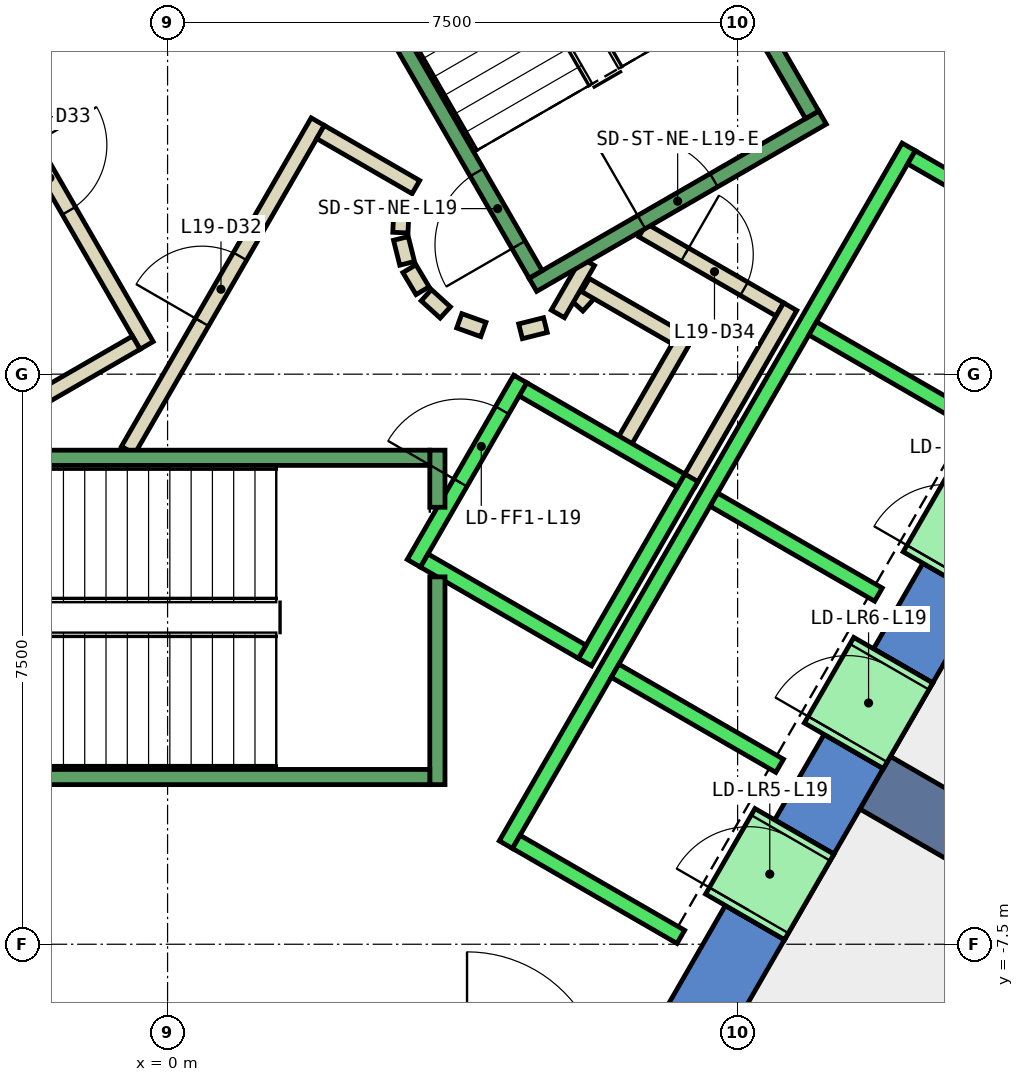
"""IFC4 building model, lengths in metres.
Left out: names, types, materials, properties, quantities, classifications, styles, units other than length and angle.
Written with IfcOpenShell. Run it as: python <this file> out.ifc"""

import sys

from ifc_helpers import new_model, si_unit, direction, frame, frame_2d, origin, place, context, subcontext, project, spatial, polyline, rectangle, outline, extrude, element, fill, save


model = new_model("IFC4")
c1 = context("Model", 3, precision=1e-05, world=origin(), true_north=direction((0.0, 1.0)))
c2 = subcontext(c1, "Body", "Model", "MODEL_VIEW")
j1 = project(units=[si_unit("LENGTHUNIT", "METRE"), si_unit("PLANEANGLEUNIT", "RADIAN")], contexts=[c1])
p1 = place(None, origin())
s1 = spatial("IfcSite", under=j1, at=p1, CompositionType="ELEMENT")
p2 = place(p1, origin())
s2 = spatial("IfcBuilding", under=s1, at=p2, CompositionType="ELEMENT")
p3 = place(p2, frame((0.0, 0.0, 90.8)))
s3 = spatial("IfcBuildingStorey", under=s2, at=p3, CompositionType="ELEMENT", Elevation=90.8)
p4 = place(p3, frame((0.0, 0.0, -0.4)))
e1 = element("IfcWall", 1, at=p4, inside=s3, PredefinedType="SHEAR", context=c2, shape_type="SweptSolid", body=[
    extrude(outline(polyline([(8.517, 11.748), (7.738, 11.298), (12.817, 2.5), (13.856, 2.5), (8.517, 11.748)])), origin(), (0.0, 0.0, 1.0), 4.2),
])
p5 = place(p3, frame((0.0, 0.0, -0.4)))
e2 = element("IfcWall", 2, at=p5, inside=s3, PredefinedType="SHEAR", context=c2, shape_type="SweptSolid", body=[
    extrude(outline(polyline([(8.117, -7.44), (7.338, -6.99), (6.409, -8.6), (6.928, -9.5), (8.117, -7.44)])), origin(), (0.0, 0.0, 1.0), 4.2),
])
p6 = place(p3, frame((0.0, 0.0, -0.4)))
e3 = element("IfcWall", 3, at=p6, inside=s3, PredefinedType="SHEAR", context=c2, shape_type="SweptSolid", body=[
    extrude(outline(polyline([(9.417, -5.189), (8.638, -4.739), (7.988, -5.864), (8.767, -6.314), (9.417, -5.189)])), origin(), (0.0, 0.0, 1.0), 4.2),
])
p7 = place(p3, frame((0.0, 0.0, -0.4)))
e4 = element("IfcWall", 4, at=p7, inside=s3, PredefinedType="SHEAR", context=c2, shape_type="SweptSolid", body=[
    extrude(outline(polyline([(10.717, -2.937), (9.938, -2.487), (9.288, -3.613), (10.067, -4.063), (10.717, -2.937)])), origin(), (0.0, 0.0, 1.0), 4.2),
])
p8 = place(p3, frame((0.0, 0.0, 3.6)))
e5 = element("IfcWall", 5, at=p8, inside=s3, PredefinedType="SHEAR", context=c2, shape_type="SweptSolid", body=[
    extrude(outline(polyline([(8.767, -6.314), (7.988, -5.864), (7.338, -6.99), (8.117, -7.44), (8.767, -6.314)])), origin(), (0.0, 0.0, 1.0), 0.2),
])
p9 = place(p3, frame((0.0, 0.0, 3.6)))
e6 = element("IfcWall", 6, at=p9, inside=s3, PredefinedType="SHEAR", context=c2, shape_type="SweptSolid", body=[
    extrude(outline(polyline([(10.067, -4.063), (9.288, -3.613), (8.638, -4.739), (9.417, -5.189), (10.067, -4.063)])), origin(), (0.0, 0.0, 1.0), 0.2),
])
p10 = place(p3, frame((0.0, 0.0, 3.6)))
e7 = element("IfcWall", 7, at=p10, inside=s3, PredefinedType="SHEAR", context=c2, shape_type="SweptSolid", body=[
    extrude(outline(polyline([(11.367, -1.811), (10.588, -1.361), (9.938, -2.487), (10.717, -2.937), (11.367, -1.811)])), origin(), (0.0, 0.0, 1.0), 0.2),
])
p11 = place(p3, frame((9.31, -5.375, -0.4), z_axis=(0.0, 0.0, 1.0), x_axis=(0.866017533419, -0.500013631625, 0.0)))
e8 = element("IfcWall", 8, at=p11, inside=s3, PredefinedType="SHEAR", context=c2, shape_type="SweptSolid", body=[
    extrude(rectangle(XDim=9.0, YDim=0.8, at=frame_2d((4.5, 0.0))), origin(), (0.0, 0.0, 1.0), 4.2),
])
p12 = place(p3, frame((5.39, 0.898, 0.0), z_axis=(0.0, 0.0, 1.0), x_axis=(0.673828488714, 0.738887791073, 0.0)))
e9 = element("IfcWall", 9, at=p12, inside=s3, PredefinedType="PARTITIONING", context=c2, shape_type="SweptSolid", body=[
    extrude(rectangle(XDim=0.263, YDim=0.2, at=frame_2d((0.131, 0.0))), origin(), (0.0, 0.0, 1.0), 3.8),
])
p13 = place(p3, frame((5.499, 1.172, 0.0), z_axis=(0.0, 0.0, 1.0), x_axis=(0.866333505267, -0.499465972466, 0.0)))
e10 = element("IfcWall", 10, at=p13, inside=s3, PredefinedType="PARTITIONING", context=c2, shape_type="SweptSolid", body=[
    extrude(rectangle(XDim=1.374, YDim=0.2, at=frame_2d((0.687, 0.0))), origin(), (0.0, 0.0, 1.0), 3.8),
])
p14 = place(p3, frame((6.826, 0.522, 0.0), z_axis=(0.0, 0.0, 1.0), x_axis=(-0.500016722714, -0.866015748706, 0.0)))
e11 = element("IfcWall", 11, at=p14, inside=s3, PredefinedType="PARTITIONING", context=c2, shape_type="SweptSolid", body=[
    extrude(rectangle(XDim=1.7, YDim=0.2, at=frame_2d((0.85, 0.0))), origin(), (0.0, 0.0, 1.0), 3.8),
])
p15 = place(p3, frame((6.25, 1.894, 0.0), z_axis=(0.0, 0.0, 1.0), x_axis=(0.866043184279, -0.499969202016, 0.0)))
e12 = element("IfcWall", 12, at=p15, inside=s3, PredefinedType="PARTITIONING", context=c2, shape_type="SweptSolid", body=[
    extrude(rectangle(XDim=2.084, YDim=0.2, at=frame_2d((1.042, 0.0))), origin(), (0.0, 0.0, 1.0), 3.8),
])
p16 = place(p15, frame((0.642, 0.0, 0.0)))
e13 = element("IfcOpeningElement", 13, at=p16, cuts=e12, PredefinedType="OPENING", context=c2, shape_type="SweptSolid", body=[
    extrude(rectangle(XDim=0.9, YDim=2.1, at=frame_2d((0.45, 1.05))), frame((0.0, 0.11, 0.0), z_axis=(0.0, -1.0, 0.0), x_axis=(1.0, 0.0, 0.0)), (0.0, 0.0, 1.0), 0.22),
])
p17 = place(p3, frame((8.192, 0.888, 0.0), z_axis=(0.0, 0.0, 1.0), x_axis=(-0.499940625693, -0.866059680843, 0.0)))
e14 = element("IfcWall", 14, at=p17, inside=s3, PredefinedType="PARTITIONING", context=c2, shape_type="SweptSolid", body=[
    extrude(rectangle(XDim=2.68, YDim=0.2, at=frame_2d((1.34, 0.0))), origin(), (0.0, 0.0, 1.0), 3.8),
])
p18 = place(p3, frame((5.135, 0.793, 0.0), z_axis=(0.0, 0.0, 1.0), x_axis=(0.499526442893, 0.866298639529, 0.0)))
e15 = element("IfcWall", 15, at=p18, inside=s3, PredefinedType="PARTITIONING", context=c2, shape_type="SweptSolid", body=[
    extrude(rectangle(XDim=0.791, YDim=0.2, at=frame_2d((0.396, 0.0))), origin(), (0.0, 0.0, 1.0), 3.8),
])
p19 = place(p3, frame((-0.52, -1.0, 0.0), z_axis=(0.0, 0.0, 1.0), x_axis=(0.50011622646, 0.865958290007, 0.0)))
e16 = element("IfcWall", 16, at=p19, inside=s3, PredefinedType="PARTITIONING", context=c2, shape_type="SweptSolid", body=[
    extrude(rectangle(XDim=4.991, YDim=0.2, at=frame_2d((2.496, 0.0))), origin(), (0.0, 0.0, 1.0), 3.8),
])
p20 = place(p19, frame((1.945, 0.0, 0.0)))
e17 = element("IfcOpeningElement", 17, at=p20, cuts=e16, PredefinedType="OPENING", context=c2, shape_type="SweptSolid", body=[
    extrude(rectangle(XDim=1.0, YDim=2.1, at=frame_2d((0.5, 1.05))), frame((0.0, 0.11, 0.0), z_axis=(0.0, -1.0, 0.0), x_axis=(1.0, 0.0, 0.0)), (0.0, 0.0, 1.0), 0.22),
])
p21 = place(p3, frame((2.012, 3.186, 0.0), z_axis=(0.0, 0.0, 1.0), x_axis=(0.865891012941, -0.500232699559, 0.0)))
e18 = element("IfcWall", 18, at=p21, inside=s3, PredefinedType="PARTITIONING", context=c2, shape_type="SweptSolid", body=[
    extrude(rectangle(XDim=1.449, YDim=0.2, at=frame_2d((0.725, 0.0))), origin(), (0.0, 0.0, 1.0), 3.8),
])
p22 = place(p3, frame((3.079, 2.199, 0.0), z_axis=(0.0, 0.0, 1.0), x_axis=(-0.047771483479, -0.998858290933, 0.0)))
e19 = element("IfcWall", 19, at=p22, inside=s3, PredefinedType="PARTITIONING", context=c2, shape_type="SweptSolid", body=[
    extrude(rectangle(XDim=0.337, YDim=0.2, at=frame_2d((0.169, 0.0))), origin(), (0.0, 0.0, 1.0), 3.8),
])
p23 = place(p3, frame((3.07, 1.786, 0.0), z_axis=(0.0, 0.0, 1.0), x_axis=(0.242705583207, -0.970099994784, 0.0)))
e20 = element("IfcWall", 20, at=p23, inside=s3, PredefinedType="PARTITIONING", context=c2, shape_type="SweptSolid", body=[
    extrude(rectangle(XDim=0.338, YDim=0.2, at=frame_2d((0.169, 0.0))), origin(), (0.0, 0.0, 1.0), 3.8),
])
for number, where, z_axis, x_axis in (
    (21, (3.182, 1.388, 0.0), (0.0, 0.0, 1.0), (0.512, -0.859, 0.0)),
    (22, (3.404, 1.039, 0.0), (0.0, 0.0, 1.0), (0.74, -0.672, 0.0)),
):
    element("IfcWall", number, at=place(p3, frame(where, z_axis=z_axis, x_axis=x_axis)), inside=s3, PredefinedType="PARTITIONING", context=c2, shape_type="SweptSolid", body=[
        extrude(rectangle(XDim=0.338, YDim=0.2, at=frame_2d((0.169, 0.0))), origin(), (0.0, 0.0, 1.0), 3.8),
    ])
p24 = place(p3, frame((3.838, 0.702, 0.0), z_axis=(0.0, 0.0, 1.0), x_axis=(0.941035081519, -0.338308993895, 0.0)))
e23 = element("IfcWall", 23, at=p24, inside=s3, PredefinedType="PARTITIONING", context=c2, shape_type="SweptSolid", body=[
    extrude(rectangle(XDim=0.337, YDim=0.2, at=frame_2d((0.168, 0.0))), origin(), (0.0, 0.0, 1.0), 3.8),
])
p25 = place(p3, frame((4.644, 0.564, 0.0), z_axis=(0.0, 0.0, 1.0), x_axis=(0.969929076366, 0.243387729394, 0.0)))
e24 = element("IfcWall", 24, at=p25, inside=s3, PredefinedType="PARTITIONING", context=c2, shape_type="SweptSolid", body=[
    extrude(rectangle(XDim=0.337, YDim=0.2, at=frame_2d((0.168, 0.0))), origin(), (0.0, 0.0, 1.0), 3.8),
])
p26 = place(p3, frame((-2.771, 4.7, 0.0), z_axis=(0.0, 0.0, 1.0), x_axis=(0.499969479948, -0.866043023828, 0.0)))
e25 = element("IfcWall", 25, at=p26, inside=s3, PredefinedType="PARTITIONING", context=c2, shape_type="SweptSolid", body=[
    extrude(rectangle(XDim=4.99, YDim=0.2, at=frame_2d((2.495, 0.0))), origin(), (0.0, 0.0, 1.0), 3.8),
])
p27 = place(p26, frame((1.945, 0.0, 0.0)))
e26 = element("IfcOpeningElement", 26, at=p27, cuts=e25, PredefinedType="OPENING", context=c2, shape_type="SweptSolid", body=[
    extrude(rectangle(XDim=1.0, YDim=2.1, at=frame_2d((0.5, 1.05))), frame((0.0, 0.11, 0.0), z_axis=(0.0, -1.0, 0.0), x_axis=(1.0, 0.0, 0.0)), (0.0, 0.0, 1.0), 0.22),
])
p28 = place(p3, frame((-0.412, 0.414, 0.0), z_axis=(0.0, 0.0, 1.0), x_axis=(-0.866017369001, -0.500013916395, 0.0)))
e27 = element("IfcWall", 27, at=p28, inside=s3, PredefinedType="PARTITIONING", context=c2, shape_type="SweptSolid", body=[
    extrude(rectangle(XDim=1.45, YDim=0.2, at=frame_2d((0.725, 0.0))), origin(), (0.0, 0.0, 1.0), 3.8),
])
p29 = place(p3, frame((12.401, -7.621, 0.0), z_axis=(0.0, 0.0, 1.0), x_axis=(-0.499983724212, -0.866034800411, 0.0)))
e28 = element("IfcWall", 28, at=p29, inside=s3, PredefinedType="PARTITIONING", context=c2, shape_type="SweptSolid", body=[
    extrude(rectangle(XDim=9.302, YDim=0.2, at=frame_2d((4.651, 0.0))), origin(), (0.0, 0.0, 1.0), 3.8),
])
p30 = place(p3, frame((3.24, -2.488, 0.0), z_axis=(0.0, 0.0, 1.0), x_axis=(0.49994636267, 0.866056369097, 0.0)))
e29 = element("IfcWall", 29, at=p30, inside=s3, PredefinedType="STANDARD", context=c2, shape_type="SweptSolid", body=[
    extrude(rectangle(XDim=2.8, YDim=0.2, at=frame_2d((1.4, 0.0))), origin(), (0.0, 0.0, 1.0), 3.8),
])
p31 = place(p30, frame((1.225, 0.0, 0.0)))
e30 = element("IfcOpeningElement", 30, at=p31, cuts=e29, PredefinedType="OPENING", context=c2, shape_type="SweptSolid", body=[
    extrude(rectangle(XDim=1.1, YDim=2.1, at=frame_2d((0.55, 1.05))), frame((0.0, 0.11, 0.0), z_axis=(0.0, -1.0, 0.0), x_axis=(1.0, 0.0, 0.0)), (0.0, 0.0, 1.0), 0.22),
])
p32 = place(p3, frame((5.492, -3.788, 0.0), z_axis=(0.0, 0.0, 1.0), x_axis=(0.500011755427, 0.866018616679, 0.0)))
e31 = element("IfcWall", 31, at=p32, inside=s3, PredefinedType="STANDARD", context=c2, shape_type="SweptSolid", body=[
    extrude(rectangle(XDim=2.8, YDim=0.2, at=frame_2d((1.4, 0.0))), origin(), (0.0, 0.0, 1.0), 3.8),
])
p33 = place(p3, frame((3.377, -2.452, 0.0), z_axis=(0.0, 0.0, 1.0), x_axis=(0.865955154139, -0.50012165622, 0.0)))
e32 = element("IfcWall", 32, at=p33, inside=s3, PredefinedType="STANDARD", context=c2, shape_type="SweptSolid", body=[
    extrude(rectangle(XDim=2.4, YDim=0.2, at=frame_2d((1.2, 0.0))), origin(), (0.0, 0.0, 1.0), 3.8),
])
p34 = place(p3, frame((4.677, -0.2, 0.0), z_axis=(0.0, 0.0, 1.0), x_axis=(0.865973769406, -0.500089422704, 0.0)))
e33 = element("IfcWall", 33, at=p34, inside=s3, PredefinedType="STANDARD", context=c2, shape_type="SweptSolid", body=[
    extrude(rectangle(XDim=2.399, YDim=0.2, at=frame_2d((1.2, 0.0))), origin(), (0.0, 0.0, 1.0), 3.8),
])
p35 = place(p3, frame((4.451, -6.19, 0.0), z_axis=(0.0, 0.0, 1.0), x_axis=(0.50000090737, 0.866024879913, 0.0)))
e34 = element("IfcWall", 34, at=p35, inside=s3, PredefinedType="STANDARD", context=c2, shape_type="SweptSolid", body=[
    extrude(rectangle(XDim=10.6, YDim=0.2, at=frame_2d((5.3, 0.0))), origin(), (0.0, 0.0, 1.0), 3.8),
])
for number, where, z_axis, x_axis in (
    (35, (4.588, -6.153, 0.0), (0.0, 0.0, 1.0), (0.866, -0.5, 0.0)),
    (36, (5.888, -3.902, 0.0), (0.0, 0.0, 1.0), (0.866, -0.5, 0.0)),
    (37, (7.188, -1.65, 0.0), (0.0, 0.0, 1.0), (0.866, -0.5, 0.0)),
    (38, (8.488, 0.602, 0.0), (0.0, 0.0, 1.0), (0.866, -0.5, 0.0)),
):
    element("IfcWall", number, at=place(p3, frame(where, z_axis=z_axis, x_axis=x_axis)), inside=s3, PredefinedType="STANDARD", context=c2, shape_type="SweptSolid", body=[
        extrude(rectangle(XDim=2.5, YDim=0.2, at=frame_2d((1.25, 0.0))), origin(), (0.0, 0.0, 1.0), 3.8),
    ])
p36 = place(p3, frame((9.788, 2.853, 0.0), z_axis=(0.0, 0.0, 1.0), x_axis=(0.865998541277, -0.500046524342, 0.0)))
e39 = element("IfcWall", 39, at=p36, inside=s3, PredefinedType="STANDARD", context=c2, shape_type="SweptSolid", body=[
    extrude(rectangle(XDim=2.5, YDim=0.2, at=frame_2d((1.25, 0.0))), origin(), (0.0, 0.0, 1.0), 3.8),
])
p37 = place(p3, frame((7.598, -7.14, 0.0), z_axis=(0.0, 0.0, 1.0), x_axis=(0.500362116554, 0.865816234728, 0.0)))
e40 = element("IfcWall", 40, at=p37, inside=s3, PredefinedType="STANDARD", context=c2, shape_type="SweptSolid", body=[
    extrude(rectangle(XDim=1.299, YDim=1.2, at=frame_2d((0.65, 0.0))), origin(), (0.0, 0.0, 1.0), 2.4),
])
p38 = place(p37, frame((0.1, 0.0, 0.0)))
e41 = element("IfcOpeningElement", 41, at=p38, cuts=e40, PredefinedType="OPENING", context=c2, shape_type="SweptSolid", body=[
    extrude(rectangle(XDim=1.1, YDim=2.3, at=frame_2d((0.55, 1.15))), frame((0.0, 0.61, 0.0), z_axis=(0.0, -1.0, 0.0), x_axis=(1.0, 0.0, 0.0)), (0.0, 0.0, 1.0), 1.22),
])
p39 = place(p3, frame((8.898, -4.889, 0.0), z_axis=(0.0, 0.0, 1.0), x_axis=(0.500036693733, 0.866004217611, 0.0)))
e42 = element("IfcWall", 42, at=p39, inside=s3, PredefinedType="STANDARD", context=c2, shape_type="SweptSolid", body=[
    extrude(rectangle(XDim=1.3, YDim=1.2, at=frame_2d((0.65, 0.0))), origin(), (0.0, 0.0, 1.0), 2.4),
])
p40 = place(p39, frame((0.1, 0.0, 0.0)))
e43 = element("IfcOpeningElement", 43, at=p40, cuts=e42, PredefinedType="OPENING", context=c2, shape_type="SweptSolid", body=[
    extrude(rectangle(XDim=1.1, YDim=2.3, at=frame_2d((0.55, 1.15))), frame((0.0, 0.61, 0.0), z_axis=(0.0, -1.0, 0.0), x_axis=(1.0, 0.0, 0.0)), (0.0, 0.0, 1.0), 1.22),
])
p41 = place(p3, frame((10.198, -2.637, 0.0), z_axis=(0.0, 0.0, 1.0), x_axis=(0.49989585183, 0.866085525409, 0.0)))
e44 = element("IfcWall", 44, at=p41, inside=s3, PredefinedType="STANDARD", context=c2, shape_type="SweptSolid", body=[
    extrude(rectangle(XDim=1.3, YDim=1.2, at=frame_2d((0.65, 0.0))), origin(), (0.0, 0.0, 1.0), 2.4),
])
p42 = place(p41, frame((0.1, 0.0, 0.0)))
e45 = element("IfcOpeningElement", 45, at=p42, cuts=e44, PredefinedType="OPENING", context=c2, shape_type="SweptSolid", body=[
    extrude(rectangle(XDim=1.1, YDim=2.3, at=frame_2d((0.55, 1.15))), frame((0.0, 0.61, 0.0), z_axis=(0.0, -1.0, 0.0), x_axis=(1.0, 0.0, 0.0)), (0.0, 0.0, 1.0), 1.22),
])
p43 = place(p3, frame((3.55, -2.667, 0.0), z_axis=(0.0, 0.0, 1.0), x_axis=(0.0, -1.0, 0.0)))
e46 = element("IfcWall", 46, at=p43, inside=s3, PredefinedType="STANDARD", context=c2, shape_type="SweptSolid", body=[
    extrude(rectangle(XDim=2.733, YDim=0.2, at=frame_2d((1.366, 0.0))), origin(), (0.0, 0.0, 1.0), 3.8),
])
p44 = place(p3, frame((3.55, -1.0, 0.0), z_axis=(0.0, 0.0, 1.0), x_axis=(0.0, -1.0, 0.0)))
e47 = element("IfcWall", 47, at=p44, inside=s3, PredefinedType="STANDARD", context=c2, shape_type="SweptSolid", body=[
    extrude(rectangle(XDim=0.751, YDim=0.2, at=frame_2d((0.375, 0.0))), origin(), (0.0, 0.0, 1.0), 3.8),
])
p45 = place(p3, frame((-3.45, -1.1, 0.0), z_axis=(0.0, 0.0, 1.0), x_axis=(1.0, 0.0, 0.0)))
e48 = element("IfcWall", 48, at=p45, inside=s3, PredefinedType="STANDARD", context=c2, shape_type="SweptSolid", body=[
    extrude(rectangle(XDim=6.9, YDim=0.2, at=frame_2d((3.45, 0.0))), origin(), (0.0, 0.0, 1.0), 3.8),
])
p46 = place(p45, frame((0.45, 0.0, 0.0)))
e49 = element("IfcOpeningElement", 49, at=p46, cuts=e48, PredefinedType="OPENING", context=c2, shape_type="SweptSolid", body=[
    extrude(rectangle(XDim=1.1, YDim=2.2, at=frame_2d((0.55, 1.1))), frame((0.0, 0.11, 0.0), z_axis=(0.0, -1.0, 0.0), x_axis=(1.0, 0.0, 0.0)), (0.0, 0.0, 1.0), 0.22),
])
p47 = place(p3, frame((-3.45, -5.3, 0.0), z_axis=(0.0, 0.0, 1.0), x_axis=(1.0, 0.0, 0.0)))
e50 = element("IfcWall", 50, at=p47, inside=s3, PredefinedType="STANDARD", context=c2, shape_type="SweptSolid", body=[
    extrude(rectangle(XDim=6.9, YDim=0.2, at=frame_2d((3.45, 0.0))), origin(), (0.0, 0.0, 1.0), 3.8),
])
p48 = place(p3, frame((4.806, 1.176, 0.0), z_axis=(0.0, 0.0, 1.0), x_axis=(0.866059941101, 0.499940174841, 0.0)))
e51 = element("IfcWall", 51, at=p48, inside=s3, PredefinedType="STANDARD", context=c2, shape_type="SweptSolid", body=[
    extrude(rectangle(XDim=4.4, YDim=0.2, at=frame_2d((2.2, 0.0))), origin(), (0.0, 0.0, 1.0), 3.8),
])
p49 = place(p48, frame((1.65, 0.0, 0.0)))
e52 = element("IfcOpeningElement", 52, at=p49, cuts=e51, PredefinedType="OPENING", context=c2, shape_type="SweptSolid", body=[
    extrude(rectangle(XDim=1.1, YDim=2.2, at=frame_2d((0.55, 1.1))), frame((0.0, 0.11, 0.0), z_axis=(0.0, -1.0, 0.0), x_axis=(1.0, 0.0, 0.0)), (0.0, 0.0, 1.0), 0.22),
])
p50 = place(p3, frame((4.843, 1.312, 0.0), z_axis=(0.0, 0.0, 1.0), x_axis=(-0.499963383562, 0.866046543262, 0.0)))
e53 = element("IfcWall", 53, at=p50, inside=s3, PredefinedType="STANDARD", context=c2, shape_type="SweptSolid", body=[
    extrude(rectangle(XDim=6.9, YDim=0.2, at=frame_2d((3.45, 0.0))), origin(), (0.0, 0.0, 1.0), 3.8),
])
p51 = place(p50, frame((0.45, 0.0, 0.0)))
e54 = element("IfcOpeningElement", 54, at=p51, cuts=e53, PredefinedType="OPENING", context=c2, shape_type="SweptSolid", body=[
    extrude(rectangle(XDim=1.1, YDim=2.2, at=frame_2d((0.55, 1.1))), frame((0.0, 0.11, 0.0), z_axis=(0.0, -1.0, 0.0), x_axis=(1.0, 0.0, 0.0)), (0.0, 0.0, 1.0), 0.22),
])
p52 = place(p3, frame((8.48, 3.412, 0.0), z_axis=(0.0, 0.0, 1.0), x_axis=(-0.499978703459, 0.866037698999, 0.0)))
e55 = element("IfcWall", 55, at=p52, inside=s3, PredefinedType="STANDARD", context=c2, shape_type="SweptSolid", body=[
    extrude(rectangle(XDim=6.9, YDim=0.2, at=frame_2d((3.45, 0.0))), origin(), (0.0, 0.0, 1.0), 3.8),
])
p53 = place(p3, frame((-1.393, 7.288, 0.0), z_axis=(0.0, 0.0, 1.0), x_axis=(-0.499963383562, -0.866046543262, 0.0)))
e56 = element("IfcWall", 56, at=p53, inside=s3, PredefinedType="STANDARD", context=c2, shape_type="SweptSolid", body=[
    extrude(rectangle(XDim=6.9, YDim=0.2, at=frame_2d((3.45, 0.0))), origin(), (0.0, 0.0, 1.0), 3.8),
])
p54 = place(p53, frame((0.45, 0.0, 0.0)))
e57 = element("IfcOpeningElement", 57, at=p54, cuts=e56, PredefinedType="OPENING", context=c2, shape_type="SweptSolid", body=[
    extrude(rectangle(XDim=1.1, YDim=2.2, at=frame_2d((0.55, 1.1))), frame((0.0, 0.11, 0.0), z_axis=(0.0, -1.0, 0.0), x_axis=(1.0, 0.0, 0.0)), (0.0, 0.0, 1.0), 0.22),
])
p55 = place(p20, origin())
e58 = element("IfcDoor", 58, at=p55, inside=s3, OperationType="SINGLE_SWING_LEFT", PredefinedType="DOOR", context=c2, shape_type="SweptSolid", body=[
    extrude(rectangle(XDim=1.0, YDim=2.1, at=frame_2d((0.5, 1.05))), frame((0.0, 0.025, 0.0), z_axis=(0.0, -1.0, 0.0), x_axis=(1.0, 0.0, 0.0)), (0.0, 0.0, 1.0), 0.05),
])
fill(e17, e58)
p56 = place(p27, origin())
e59 = element("IfcDoor", 59, at=p56, inside=s3, OperationType="SINGLE_SWING_RIGHT", PredefinedType="DOOR", context=c2, shape_type="SweptSolid", body=[
    extrude(rectangle(XDim=1.0, YDim=2.1, at=frame_2d((0.5, 1.05))), frame((0.0, 0.025, 0.0), z_axis=(0.0, -1.0, 0.0), x_axis=(1.0, 0.0, 0.0)), (0.0, 0.0, 1.0), 0.05),
])
fill(e26, e59)
p57 = place(p16, origin())
e60 = element("IfcDoor", 60, at=p57, inside=s3, OperationType="SINGLE_SWING_LEFT", PredefinedType="DOOR", context=c2, shape_type="SweptSolid", body=[
    extrude(rectangle(XDim=0.9, YDim=2.1, at=frame_2d((0.45, 1.05))), frame((0.0, 0.025, 0.0), z_axis=(0.0, -1.0, 0.0), x_axis=(1.0, 0.0, 0.0)), (0.0, 0.0, 1.0), 0.05),
])
fill(e13, e60)
p58 = place(p38, origin())
e61 = element("IfcDoor", 61, at=p58, inside=s3, OperationType="SLIDING_TO_LEFT", PredefinedType="DOOR", context=c2, shape_type="SweptSolid", body=[
    extrude(rectangle(XDim=1.1, YDim=2.3, at=frame_2d((0.55, 1.15))), frame((0.0, 0.025, 0.0), z_axis=(0.0, -1.0, 0.0), x_axis=(1.0, 0.0, 0.0)), (0.0, 0.0, 1.0), 0.05),
])
fill(e41, e61)
p59 = place(p40, origin())
e62 = element("IfcDoor", 62, at=p59, inside=s3, OperationType="SLIDING_TO_LEFT", PredefinedType="DOOR", context=c2, shape_type="SweptSolid", body=[
    extrude(rectangle(XDim=1.1, YDim=2.3, at=frame_2d((0.55, 1.15))), frame((0.0, 0.025, 0.0), z_axis=(0.0, -1.0, 0.0), x_axis=(1.0, 0.0, 0.0)), (0.0, 0.0, 1.0), 0.05),
])
fill(e43, e62)
p60 = place(p31, origin())
e63 = element("IfcDoor", 63, at=p60, inside=s3, OperationType="SLIDING_TO_LEFT", PredefinedType="DOOR", context=c2, shape_type="SweptSolid", body=[
    extrude(rectangle(XDim=1.1, YDim=2.1, at=frame_2d((0.55, 1.05))), frame((0.0, 0.025, 0.0), z_axis=(0.0, -1.0, 0.0), x_axis=(1.0, 0.0, 0.0)), (0.0, 0.0, 1.0), 0.05),
])
fill(e30, e63)
p61 = place(p51, origin())
e64 = element("IfcDoor", 64, at=p61, inside=s3, OperationType="SINGLE_SWING_LEFT", PredefinedType="DOOR", context=c2, shape_type="SweptSolid", body=[
    extrude(rectangle(XDim=1.1, YDim=2.2, at=frame_2d((0.55, 1.1))), frame((0.0, 0.025, 0.0), z_axis=(0.0, -1.0, 0.0), x_axis=(1.0, 0.0, 0.0)), (0.0, 0.0, 1.0), 0.05),
])
fill(e54, e64)
p62 = place(p49, origin())
e65 = element("IfcDoor", 65, at=p62, inside=s3, OperationType="SINGLE_SWING_LEFT", PredefinedType="DOOR", context=c2, shape_type="SweptSolid", body=[
    extrude(rectangle(XDim=1.1, YDim=2.2, at=frame_2d((0.55, 1.1))), frame((0.0, 0.025, 0.0), z_axis=(0.0, -1.0, 0.0), x_axis=(1.0, 0.0, 0.0)), (0.0, 0.0, 1.0), 0.05),
])
fill(e52, e65)
save(model, sys.argv[1])
